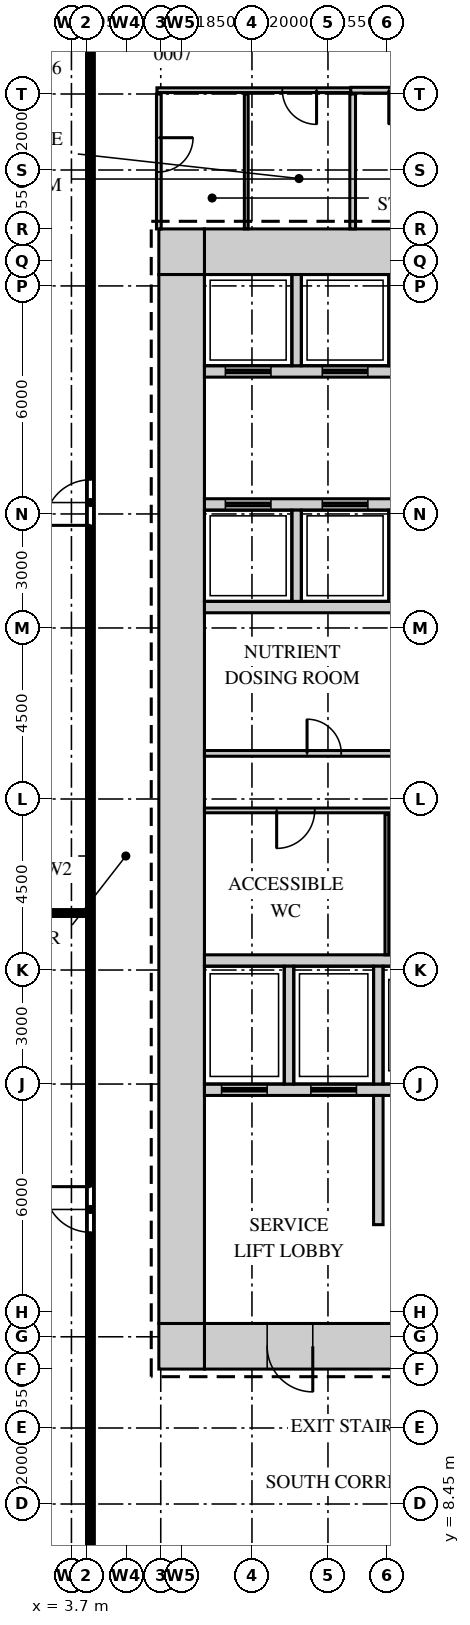
"""IFC4 building model, lengths in metres.
Left out: names, types, materials, properties, quantities, classifications, styles, units other than length and angle.
Written with IfcOpenShell. Run it as: python <this file> out.ifc"""

import sys

from ifc_helpers import new_model, si_unit, direction, frame, frame_2d, origin, place, context, subcontext, project, spatial, rectangle, extrude, source, transform, mapped, element, fill, save


model = new_model("IFC4")
c1 = context("Model", 3, precision=1e-05, world=origin(), true_north=direction((0.0, 1.0)))
c2 = subcontext(c1, "Body", "Model", "MODEL_VIEW")
j1 = project(units=[si_unit("LENGTHUNIT", "METRE"), si_unit("PLANEANGLEUNIT", "RADIAN")], contexts=[c1])
p1 = place(None, origin())
s1 = spatial("IfcSite", under=j1, at=p1, CompositionType="ELEMENT")
p2 = place(p1, origin())
s2 = spatial("IfcBuilding", under=s1, at=p2, CompositionType="ELEMENT")
p3 = place(p2, frame((0.0, 0.0, 28.5)))
s3 = spatial("IfcBuildingStorey", under=s2, at=p3, CompositionType="ELEMENT", Elevation=28.5)
m1 = source(origin(), c2, "Body", "SweptSolid", [
    extrude(rectangle(XDim=6.7, YDim=1.2, at=frame_2d((3.35, 0.0))), origin(), (0.0, 0.0, 1.0), 4.0),
])
p4 = place(p3, frame((7.2, 41.4, 0.0), z_axis=(0.0, 0.0, 1.0), x_axis=(1.0, 0.0, 0.0)))
e1 = element("IfcWall", 1, at=p4, inside=s3, PredefinedType="SHEAR", context=c2, shape_type="MappedRepresentation", body=[
    mapped(m1, transform((0.0, 0.0, 0.0))),
])
m2 = source(origin(), c2, "Body", "SweptSolid", [
    extrude(rectangle(XDim=1.2, YDim=1.2, at=frame_2d((0.6, 0.0))), origin(), (0.0, 0.0, 1.0), 4.0),
])
p5 = place(p3, frame((6.0, 41.4, 0.0), z_axis=(0.0, 0.0, 1.0), x_axis=(1.0, 0.0, 0.0)))
e2 = element("IfcWall", 2, at=p5, inside=s3, PredefinedType="SHEAR", context=c2, shape_type="MappedRepresentation", body=[
    mapped(m2, transform((0.0, 0.0, 0.0))),
])
p6 = place(p3, frame((7.2, 12.6, 0.0), z_axis=(0.0, 0.0, 1.0), x_axis=(1.0, 0.0, 0.0)))
e3 = element("IfcWall", 3, at=p6, inside=s3, PredefinedType="SHEAR", context=c2, shape_type="MappedRepresentation", body=[
    mapped(m1, transform((0.0, 0.0, 0.0))),
])
m3 = source(origin(), c2, "Body", "SweptSolid", [
    extrude(rectangle(XDim=1.2, YDim=2.1, at=frame_2d((0.6, 1.05))), frame((0.0, 0.61, 0.0), z_axis=(0.0, -1.0, 0.0), x_axis=(1.0, 0.0, 0.0)), (0.0, 0.0, 1.0), 1.22),
])
p7 = place(p6, frame((5.0, 0.0, 0.0)))
e4 = element("IfcOpeningElement", 4, at=p7, cuts=e3, PredefinedType="OPENING", context=c2, shape_type="MappedRepresentation", body=[
    mapped(m3, transform((0.0, 0.0, 0.0))),
])
p8 = place(p6, frame((1.65, 0.0, 0.0)))
e5 = element("IfcOpeningElement", 5, at=p8, cuts=e3, PredefinedType="OPENING", context=c2, shape_type="MappedRepresentation", body=[
    mapped(m3, transform((0.0, 0.0, 0.0))),
])
p9 = place(p3, frame((6.0, 12.6, 0.0), z_axis=(0.0, 0.0, 1.0), x_axis=(1.0, 0.0, 0.0)))
e6 = element("IfcWall", 6, at=p9, inside=s3, PredefinedType="SHEAR", context=c2, shape_type="MappedRepresentation", body=[
    mapped(m2, transform((0.0, 0.0, 0.0))),
])
m4 = source(origin(), c2, "Body", "SweptSolid", [
    extrude(rectangle(XDim=27.6, YDim=1.2, at=frame_2d((13.8, 0.0))), origin(), (0.0, 0.0, 1.0), 4.0),
])
p10 = place(p3, frame((6.6, 13.2, 0.0), z_axis=(0.0, 0.0, 1.0), x_axis=(0.0, 1.0, 0.0)))
e7 = element("IfcWall", 7, at=p10, inside=s3, PredefinedType="SHEAR", context=c2, shape_type="MappedRepresentation", body=[
    mapped(m4, transform((0.0, 0.0, 0.0))),
])
m5 = source(origin(), c2, "Body", "SweptSolid", [
    extrude(rectangle(XDim=13.0, YDim=0.3, at=frame_2d((6.5, 0.0))), origin(), (0.0, 0.0, 1.0), 4.0),
])
p11 = place(p3, frame((7.2, 22.75, 0.0), z_axis=(0.0, 0.0, 1.0), x_axis=(1.0, 0.0, 0.0)))
e8 = element("IfcWall", 8, at=p11, inside=s3, PredefinedType="STANDARD", context=c2, shape_type="MappedRepresentation", body=[
    mapped(m5, transform((0.0, 0.0, 0.0))),
])
m6 = source(origin(), c2, "Body", "SweptSolid", [
    extrude(rectangle(XDim=8.875, YDim=0.3, at=frame_2d((4.438, 0.0))), origin(), (0.0, 0.0, 1.0), 4.0),
])
p12 = place(p3, frame((7.2, 19.35, 0.0), z_axis=(0.0, 0.0, 1.0), x_axis=(1.0, 0.0, 0.0)))
e9 = element("IfcWall", 9, at=p12, inside=s3, PredefinedType="STANDARD", context=c2, shape_type="MappedRepresentation", body=[
    mapped(m6, transform((0.0, 0.0, 0.0))),
])
m7 = source(origin(), c2, "Body", "SweptSolid", [
    extrude(rectangle(XDim=1.2, YDim=2.1, at=frame_2d((0.6, 1.05))), frame((0.0, 0.16, 0.0), z_axis=(0.0, -1.0, 0.0), x_axis=(1.0, 0.0, 0.0)), (0.0, 0.0, 1.0), 0.32),
])
p13 = place(p12, frame((0.45, 0.0, 0.0)))
e10 = element("IfcOpeningElement", 10, at=p13, cuts=e9, PredefinedType="OPENING", context=c2, shape_type="MappedRepresentation", body=[
    mapped(m7, transform((0.0, 0.0, 0.0))),
])
p14 = place(p12, frame((2.8, 0.0, 0.0)))
e11 = element("IfcOpeningElement", 11, at=p14, cuts=e9, PredefinedType="OPENING", context=c2, shape_type="MappedRepresentation", body=[
    mapped(m7, transform((0.0, 0.0, 0.0))),
])
p15 = place(p12, frame((5.05, 0.0, 0.0)))
e12 = element("IfcOpeningElement", 12, at=p15, cuts=e9, PredefinedType="OPENING", context=c2, shape_type="MappedRepresentation", body=[
    mapped(m7, transform((0.0, 0.0, 0.0))),
])
p16 = place(p12, frame((7.2, 0.0, 0.0)))
e13 = element("IfcOpeningElement", 13, at=p16, cuts=e9, PredefinedType="OPENING", context=c2, shape_type="MappedRepresentation", body=[
    mapped(m7, transform((0.0, 0.0, 0.0))),
])
m8 = source(origin(), c2, "Body", "SweptSolid", [
    extrude(rectangle(XDim=15.6, YDim=0.3, at=frame_2d((7.8, 0.0))), origin(), (0.0, 0.0, 1.0), 4.0),
])
p17 = place(p3, frame((7.2, 32.05, 0.0), z_axis=(0.0, 0.0, 1.0), x_axis=(1.0, 0.0, 0.0)))
e14 = element("IfcWall", 14, at=p17, inside=s3, PredefinedType="STANDARD", context=c2, shape_type="MappedRepresentation", body=[
    mapped(m8, transform((0.0, 0.0, 0.0))),
])
p18 = place(p3, frame((7.2, 38.25, 0.0), z_axis=(0.0, 0.0, 1.0), x_axis=(1.0, 0.0, 0.0)))
e15 = element("IfcWall", 15, at=p18, inside=s3, PredefinedType="STANDARD", context=c2, shape_type="MappedRepresentation", body=[
    mapped(m8, transform((0.0, 0.0, 0.0))),
])
p19 = place(p18, frame((0.55, 0.0, 0.0)))
e16 = element("IfcOpeningElement", 16, at=p19, cuts=e15, PredefinedType="OPENING", context=c2, shape_type="MappedRepresentation", body=[
    mapped(m7, transform((0.0, 0.0, 0.0))),
])
p20 = place(p18, frame((3.1, 0.0, 0.0)))
e17 = element("IfcOpeningElement", 17, at=p20, cuts=e15, PredefinedType="OPENING", context=c2, shape_type="MappedRepresentation", body=[
    mapped(m7, transform((0.0, 0.0, 0.0))),
])
p21 = place(p18, frame((5.65, 0.0, 0.0)))
e18 = element("IfcOpeningElement", 18, at=p21, cuts=e15, PredefinedType="OPENING", context=c2, shape_type="MappedRepresentation", body=[
    mapped(m7, transform((0.0, 0.0, 0.0))),
])
p22 = place(p18, frame((8.2, 0.0, 0.0)))
e19 = element("IfcOpeningElement", 19, at=p22, cuts=e15, PredefinedType="OPENING", context=c2, shape_type="MappedRepresentation", body=[
    mapped(m7, transform((0.0, 0.0, 0.0))),
])
p23 = place(p3, frame((7.2, 34.75, 0.0), z_axis=(0.0, 0.0, 1.0), x_axis=(1.0, 0.0, 0.0)))
e20 = element("IfcWall", 20, at=p23, inside=s3, PredefinedType="STANDARD", context=c2, shape_type="MappedRepresentation", body=[
    mapped(m8, transform((0.0, 0.0, 0.0))),
])
p24 = place(p23, frame((0.55, 0.0, 0.0)))
e21 = element("IfcOpeningElement", 21, at=p24, cuts=e20, PredefinedType="OPENING", context=c2, shape_type="MappedRepresentation", body=[
    mapped(m7, transform((0.0, 0.0, 0.0))),
])
p25 = place(p23, frame((3.1, 0.0, 0.0)))
e22 = element("IfcOpeningElement", 22, at=p25, cuts=e20, PredefinedType="OPENING", context=c2, shape_type="MappedRepresentation", body=[
    mapped(m7, transform((0.0, 0.0, 0.0))),
])
p26 = place(p23, frame((5.65, 0.0, 0.0)))
e23 = element("IfcOpeningElement", 23, at=p26, cuts=e20, PredefinedType="OPENING", context=c2, shape_type="MappedRepresentation", body=[
    mapped(m7, transform((0.0, 0.0, 0.0))),
])
p27 = place(p23, frame((8.2, 0.0, 0.0)))
e24 = element("IfcOpeningElement", 24, at=p27, cuts=e20, PredefinedType="OPENING", context=c2, shape_type="MappedRepresentation", body=[
    mapped(m7, transform((0.0, 0.0, 0.0))),
])
m9 = source(origin(), c2, "Body", "SweptSolid", [
    extrude(rectangle(XDim=3.1, YDim=0.25, at=frame_2d((1.55, 0.0))), origin(), (0.0, 0.0, 1.0), 4.0),
])
for number, where, z_axis, x_axis in (
    (25, (9.425, 19.5, 0.0), (0.0, 0.0, 1.0), (0.0, 1.0, 0.0)),
    (26, (11.775, 19.5, 0.0), (0.0, 0.0, 1.0), (0.0, 1.0, 0.0)),
):
    element("IfcWall", number, at=place(p3, frame(where, z_axis=z_axis, x_axis=x_axis)), inside=s3, PredefinedType="STANDARD", context=c2, shape_type="MappedRepresentation", body=[
        mapped(m9, transform((0.0, 0.0, 0.0))),
    ])
m10 = source(origin(), c2, "Body", "SweptSolid", [
    extrude(rectangle(XDim=2.4, YDim=0.25, at=frame_2d((1.2, 0.0))), origin(), (0.0, 0.0, 1.0), 4.0),
])
for number, where, z_axis, x_axis in (
    (27, (9.625, 38.4, 0.0), (0.0, 0.0, 1.0), (0.0, 1.0, 0.0)),
    (28, (12.175, 38.4, 0.0), (0.0, 0.0, 1.0), (0.0, 1.0, 0.0)),
    (29, (9.625, 32.2, 0.0), (0.0, 0.0, 1.0), (0.0, 1.0, 0.0)),
    (30, (12.175, 32.2, 0.0), (0.0, 0.0, 1.0), (0.0, 1.0, 0.0)),
):
    element("IfcWall", number, at=place(p3, frame(where, z_axis=z_axis, x_axis=x_axis)), inside=s3, PredefinedType="STANDARD", context=c2, shape_type="MappedRepresentation", body=[
        mapped(m10, transform((0.0, 0.0, 0.0))),
    ])
m11 = source(origin(), c2, "Body", "SweptSolid", [
    extrude(rectangle(XDim=3.4, YDim=0.25, at=frame_2d((1.7, 0.0))), origin(), (0.0, 0.0, 1.0), 4.0),
])
p28 = place(p3, frame((11.775, 15.8, 0.0), z_axis=(0.0, 0.0, 1.0), x_axis=(0.0, 1.0, 0.0)))
e31 = element("IfcWall", 31, at=p28, inside=s3, PredefinedType="STANDARD", context=c2, shape_type="MappedRepresentation", body=[
    mapped(m11, transform((0.0, 0.0, 0.0))),
])
m12 = source(origin(), c2, "Body", "SweptSolid", [
    extrude(rectangle(XDim=41.8, YDim=0.125, at=frame_2d((20.9, 0.0))), origin(), (0.0, 0.0, 1.0), 4.0),
])
p29 = place(p3, frame((4.2, 6.15, 0.0), z_axis=(0.0, 0.0, 1.0), x_axis=(0.0, 1.0, 0.0)))
e32 = element("IfcWall", 32, at=p29, inside=s3, PredefinedType="PARTITIONING", context=c2, shape_type="MappedRepresentation", body=[
    mapped(m12, transform((0.0, 0.0, 0.0))),
])
m13 = source(origin(), c2, "Body", "SweptSolid", [
    extrude(rectangle(XDim=1.2, YDim=2.1, at=frame_2d((0.6, 1.05))), frame((0.0, 0.073, 0.0), z_axis=(0.0, -1.0, 0.0), x_axis=(1.0, 0.0, 0.0)), (0.0, 0.0, 1.0), 0.145),
])
p30 = place(p29, frame((9.45, 0.0, 0.0)))
e33 = element("IfcOpeningElement", 33, at=p30, cuts=e32, PredefinedType="OPENING", context=c2, shape_type="MappedRepresentation", body=[
    mapped(m13, transform((0.0, 0.0, 0.0))),
])
p31 = place(p29, frame((28.05, 0.0, 0.0)))
e34 = element("IfcOpeningElement", 34, at=p31, cuts=e32, PredefinedType="OPENING", context=c2, shape_type="MappedRepresentation", body=[
    mapped(m13, transform((0.0, 0.0, 0.0))),
])
m14 = source(origin(), c2, "Body", "SweptSolid", [
    extrude(rectangle(XDim=3.7, YDim=0.1, at=frame_2d((1.85, 0.0))), origin(), (0.0, 0.0, 1.0), 4.0),
])
p32 = place(p3, frame((12.0, 22.9, 0.0), z_axis=(0.0, 0.0, 1.0), x_axis=(0.0, 1.0, 0.0)))
e35 = element("IfcWall", 35, at=p32, inside=s3, PredefinedType="PARTITIONING", context=c2, shape_type="MappedRepresentation", body=[
    mapped(m14, transform((0.0, 0.0, 0.0))),
])
m15 = source(origin(), c2, "Body", "SweptSolid", [
    extrude(rectangle(XDim=12.7, YDim=0.1, at=frame_2d((6.35, 0.0))), origin(), (0.0, 0.0, 1.0), 4.0),
])
p33 = place(p3, frame((-8.6, 24.0, 0.0), z_axis=(0.0, 0.0, 1.0), x_axis=(1.0, 0.0, 0.0)))
e36 = element("IfcWall", 36, at=p33, inside=s3, PredefinedType="PARTITIONING", context=c2, shape_type="MappedRepresentation", body=[
    mapped(m15, transform((0.0, 0.0, 0.0))),
])
m16 = source(origin(), c2, "Body", "SweptSolid", [
    extrude(rectangle(XDim=15.6, YDim=0.125, at=frame_2d((7.8, 0.0))), origin(), (0.0, 0.0, 1.0), 4.0),
])
p34 = place(p3, frame((7.2, 26.7, 0.0), z_axis=(0.0, 0.0, 1.0), x_axis=(1.0, 0.0, 0.0)))
e37 = element("IfcWall", 37, at=p34, inside=s3, PredefinedType="PARTITIONING", context=c2, shape_type="MappedRepresentation", body=[
    mapped(m16, transform((0.0, 0.0, 0.0))),
])
m17 = source(origin(), c2, "Body", "SweptSolid", [
    extrude(rectangle(XDim=1.0, YDim=2.1, at=frame_2d((0.5, 1.05))), frame((0.0, 0.073, 0.0), z_axis=(0.0, -1.0, 0.0), x_axis=(1.0, 0.0, 0.0)), (0.0, 0.0, 1.0), 0.145),
])
p35 = place(p34, frame((1.9, 0.0, 0.0)))
e38 = element("IfcOpeningElement", 38, at=p35, cuts=e37, PredefinedType="OPENING", context=c2, shape_type="MappedRepresentation", body=[
    mapped(m17, transform((0.0, 0.0, 0.0))),
])
m18 = source(origin(), c2, "Body", "SweptSolid", [
    extrude(rectangle(XDim=0.9, YDim=2.1, at=frame_2d((0.45, 1.05))), frame((0.0, 0.073, 0.0), z_axis=(0.0, -1.0, 0.0), x_axis=(1.0, 0.0, 0.0)), (0.0, 0.0, 1.0), 0.145),
])
p36 = place(p34, frame((7.05, 0.0, 0.0)))
e39 = element("IfcOpeningElement", 39, at=p36, cuts=e37, PredefinedType="OPENING", context=c2, shape_type="MappedRepresentation", body=[
    mapped(m18, transform((0.0, 0.0, 0.0))),
])
p37 = place(p34, frame((12.45, 0.0, 0.0)))
e40 = element("IfcOpeningElement", 40, at=p37, cuts=e37, PredefinedType="OPENING", context=c2, shape_type="MappedRepresentation", body=[
    mapped(m18, transform((0.0, 0.0, 0.0))),
])
m19 = source(origin(), c2, "Body", "SweptSolid", [
    extrude(rectangle(XDim=6.35, YDim=0.15, at=frame_2d((3.175, 0.0))), origin(), (0.0, 0.0, 1.0), 4.0),
])
p38 = place(p3, frame((7.2, 28.2, 0.0), z_axis=(0.0, 0.0, 1.0), x_axis=(1.0, 0.0, 0.0)))
e41 = element("IfcWall", 41, at=p38, inside=s3, PredefinedType="PARTITIONING", context=c2, shape_type="MappedRepresentation", body=[
    mapped(m19, transform((0.0, 0.0, 0.0))),
])
m20 = source(origin(), c2, "Body", "SweptSolid", [
    extrude(rectangle(XDim=0.9, YDim=2.1, at=frame_2d((0.45, 1.05))), frame((0.0, 0.085, 0.0), z_axis=(0.0, -1.0, 0.0), x_axis=(1.0, 0.0, 0.0)), (0.0, 0.0, 1.0), 0.17),
])
p39 = place(p38, frame((2.7, 0.0, 0.0)))
e42 = element("IfcOpeningElement", 42, at=p39, cuts=e41, PredefinedType="OPENING", context=c2, shape_type="MappedRepresentation", body=[
    mapped(m20, transform((0.0, 0.0, 0.0))),
])
m21 = source(origin(), c2, "Body", "SweptSolid", [
    extrude(rectangle(XDim=3.55, YDim=0.125, at=frame_2d((1.775, 0.0))), origin(), (0.0, 0.0, 1.0), 4.0),
])
p40 = place(p3, frame((6.0, 42.0, 0.0), z_axis=(0.0, 0.0, 1.0), x_axis=(0.0, 1.0, 0.0)))
e43 = element("IfcWall", 43, at=p40, inside=s3, PredefinedType="PARTITIONING", context=c2, shape_type="MappedRepresentation", body=[
    mapped(m21, transform((0.0, 0.0, 0.0))),
])
p41 = place(p40, frame((1.5, 0.0, 0.0)))
e44 = element("IfcOpeningElement", 44, at=p41, cuts=e43, PredefinedType="OPENING", context=c2, shape_type="MappedRepresentation", body=[
    mapped(m18, transform((0.0, 0.0, 0.0))),
])
m22 = source(origin(), c2, "Body", "SweptSolid", [
    extrude(rectangle(XDim=3.55, YDim=0.1, at=frame_2d((1.775, 0.0))), origin(), (0.0, 0.0, 1.0), 4.0),
])
p42 = place(p3, frame((8.3, 42.0, 0.0), z_axis=(0.0, 0.0, 1.0), x_axis=(0.0, 1.0, 0.0)))
e45 = element("IfcWall", 45, at=p42, inside=s3, PredefinedType="PARTITIONING", context=c2, shape_type="MappedRepresentation", body=[
    mapped(m22, transform((0.0, 0.0, 0.0))),
])
m23 = source(origin(), c2, "Body", "SweptSolid", [
    extrude(rectangle(XDim=3.55, YDim=0.15, at=frame_2d((1.775, 0.0))), origin(), (0.0, 0.0, 1.0), 4.0),
])
p43 = place(p3, frame((11.1, 42.0, 0.0), z_axis=(0.0, 0.0, 1.0), x_axis=(0.0, 1.0, 0.0)))
e46 = element("IfcWall", 46, at=p43, inside=s3, PredefinedType="PARTITIONING", context=c2, shape_type="MappedRepresentation", body=[
    mapped(m23, transform((0.0, 0.0, 0.0))),
])
m24 = source(origin(), c2, "Body", "SweptSolid", [
    extrude(rectangle(XDim=5.1, YDim=0.125, at=frame_2d((2.55, 0.0))), origin(), (0.0, 0.0, 1.0), 4.0),
])
p44 = place(p3, frame((5.95, 45.65, 0.0), z_axis=(0.0, 0.0, 1.0), x_axis=(1.0, 0.0, 0.0)))
e47 = element("IfcWall", 47, at=p44, inside=s3, PredefinedType="PARTITIONING", context=c2, shape_type="MappedRepresentation", body=[
    mapped(m24, transform((0.0, 0.0, 0.0))),
])
p45 = place(p44, frame((3.3, 0.0, 0.0)))
e48 = element("IfcOpeningElement", 48, at=p45, cuts=e47, PredefinedType="OPENING", context=c2, shape_type="MappedRepresentation", body=[
    mapped(m18, transform((0.0, 0.0, 0.0))),
])
m25 = source(origin(), c2, "Body", "SweptSolid", [
    extrude(rectangle(XDim=2.85, YDim=0.15, at=frame_2d((1.425, 0.0))), origin(), (0.0, 0.0, 1.0), 4.0),
])
p46 = place(p3, frame((11.05, 45.65, 0.0), z_axis=(0.0, 0.0, 1.0), x_axis=(1.0, 0.0, 0.0)))
e49 = element("IfcWall", 49, at=p46, inside=s3, PredefinedType="PARTITIONING", context=c2, shape_type="MappedRepresentation", body=[
    mapped(m25, transform((0.0, 0.0, 0.0))),
])
p47 = place(p46, frame((1.0, 0.0, 0.0)))
e50 = element("IfcOpeningElement", 50, at=p47, cuts=e49, PredefinedType="OPENING", context=c2, shape_type="MappedRepresentation", body=[
    mapped(m20, transform((0.0, 0.0, 0.0))),
])
m26 = source(origin(), c2, "Body", "SweptSolid", [
    extrude(rectangle(XDim=0.9, YDim=2.1, at=frame_2d((0.45, 1.05))), frame((0.0, 0.025, 0.0), z_axis=(0.0, -1.0, 0.0), x_axis=(1.0, 0.0, 0.0)), (0.0, 0.0, 1.0), 0.05),
])
p48 = place(p39, origin())
e51 = element("IfcDoor", 51, at=p48, inside=s3, OperationType="SINGLE_SWING_RIGHT", PredefinedType="DOOR", context=c2, shape_type="MappedRepresentation", body=[
    mapped(m26, transform((0.0, 0.0, 0.0))),
])
fill(e42, e51)
m27 = source(origin(), c2, "Body", "SweptSolid", [
    extrude(rectangle(XDim=1.0, YDim=2.1, at=frame_2d((0.5, 1.05))), frame((0.0, 0.025, 0.0), z_axis=(0.0, -1.0, 0.0), x_axis=(1.0, 0.0, 0.0)), (0.0, 0.0, 1.0), 0.05),
])
p49 = place(p35, origin())
e52 = element("IfcDoor", 52, at=p49, inside=s3, OperationType="SINGLE_SWING_LEFT", PredefinedType="DOOR", context=c2, shape_type="MappedRepresentation", body=[
    mapped(m27, transform((0.0, 0.0, 0.0))),
])
fill(e38, e52)
m28 = source(origin(), c2, "Body", "SweptSolid", [
    extrude(rectangle(XDim=1.2, YDim=2.1, at=frame_2d((0.6, 1.05))), frame((0.0, 0.55, 0.0), z_axis=(0.0, -1.0, 0.0), x_axis=(1.0, 0.0, 0.0)), (0.0, 0.0, 1.0), 1.1),
])
p50 = place(p8, origin())
e53 = element("IfcDoor", 53, at=p50, inside=s3, OperationType="SINGLE_SWING_RIGHT", PredefinedType="DOOR", context=c2, shape_type="MappedRepresentation", body=[
    mapped(m28, transform((0.0, 0.0, 0.0))),
])
fill(e5, e53)
p51 = place(p41, origin())
e54 = element("IfcDoor", 54, at=p51, inside=s3, OperationType="SINGLE_SWING_RIGHT", PredefinedType="DOOR", context=c2, shape_type="MappedRepresentation", body=[
    mapped(m26, transform((0.0, 0.0, 0.0))),
])
fill(e44, e54)
p52 = place(p45, origin())
e55 = element("IfcDoor", 55, at=p52, inside=s3, OperationType="SINGLE_SWING_RIGHT", PredefinedType="DOOR", context=c2, shape_type="MappedRepresentation", body=[
    mapped(m26, transform((0.0, 0.0, 0.0))),
])
fill(e48, e55)
p53 = place(p47, origin())
e56 = element("IfcDoor", 56, at=p53, inside=s3, OperationType="SINGLE_SWING_LEFT", PredefinedType="DOOR", context=c2, shape_type="MappedRepresentation", body=[
    mapped(m26, transform((0.0, 0.0, 0.0))),
])
fill(e50, e56)
m29 = source(origin(), c2, "Body", "SweptSolid", [
    extrude(rectangle(XDim=1.2, YDim=2.1, at=frame_2d((0.6, 1.05))), frame((0.0, 0.025, 0.0), z_axis=(0.0, -1.0, 0.0), x_axis=(1.0, 0.0, 0.0)), (0.0, 0.0, 1.0), 0.05),
])
p54 = place(p30, origin())
e57 = element("IfcDoor", 57, at=p54, inside=s3, OperationType="SINGLE_SWING_LEFT", PredefinedType="DOOR", context=c2, shape_type="MappedRepresentation", body=[
    mapped(m29, transform((0.0, 0.0, 0.0))),
])
fill(e33, e57)
p55 = place(p31, origin())
e58 = element("IfcDoor", 58, at=p55, inside=s3, OperationType="SINGLE_SWING_RIGHT", PredefinedType="DOOR", context=c2, shape_type="MappedRepresentation", body=[
    mapped(m29, transform((0.0, 0.0, 0.0))),
])
fill(e34, e58)
p56 = place(p24, origin())
e59 = element("IfcDoor", 59, at=p56, inside=s3, OperationType="DOUBLE_DOOR_SLIDING", PredefinedType="DOOR", context=c2, shape_type="MappedRepresentation", body=[
    mapped(m29, transform((0.0, 0.0, 0.0))),
])
fill(e21, e59)
p57 = place(p25, origin())
e60 = element("IfcDoor", 60, at=p57, inside=s3, OperationType="DOUBLE_DOOR_SLIDING", PredefinedType="DOOR", context=c2, shape_type="MappedRepresentation", body=[
    mapped(m29, transform((0.0, 0.0, 0.0))),
])
fill(e22, e60)
p58 = place(p19, origin())
e61 = element("IfcDoor", 61, at=p58, inside=s3, OperationType="DOUBLE_DOOR_SLIDING", PredefinedType="DOOR", context=c2, shape_type="MappedRepresentation", body=[
    mapped(m29, transform((0.0, 0.0, 0.0))),
])
fill(e16, e61)
p59 = place(p20, origin())
e62 = element("IfcDoor", 62, at=p59, inside=s3, OperationType="DOUBLE_DOOR_SLIDING", PredefinedType="DOOR", context=c2, shape_type="MappedRepresentation", body=[
    mapped(m29, transform((0.0, 0.0, 0.0))),
])
fill(e17, e62)
p60 = place(p13, origin())
e63 = element("IfcDoor", 63, at=p60, inside=s3, OperationType="DOUBLE_DOOR_SLIDING", PredefinedType="DOOR", context=c2, shape_type="MappedRepresentation", body=[
    mapped(m29, transform((0.0, 0.0, 0.0))),
])
fill(e10, e63)
p61 = place(p14, origin())
e64 = element("IfcDoor", 64, at=p61, inside=s3, OperationType="DOUBLE_DOOR_SLIDING", PredefinedType="DOOR", context=c2, shape_type="MappedRepresentation", body=[
    mapped(m29, transform((0.0, 0.0, 0.0))),
])
fill(e11, e64)
save(model, sys.argv[1])
